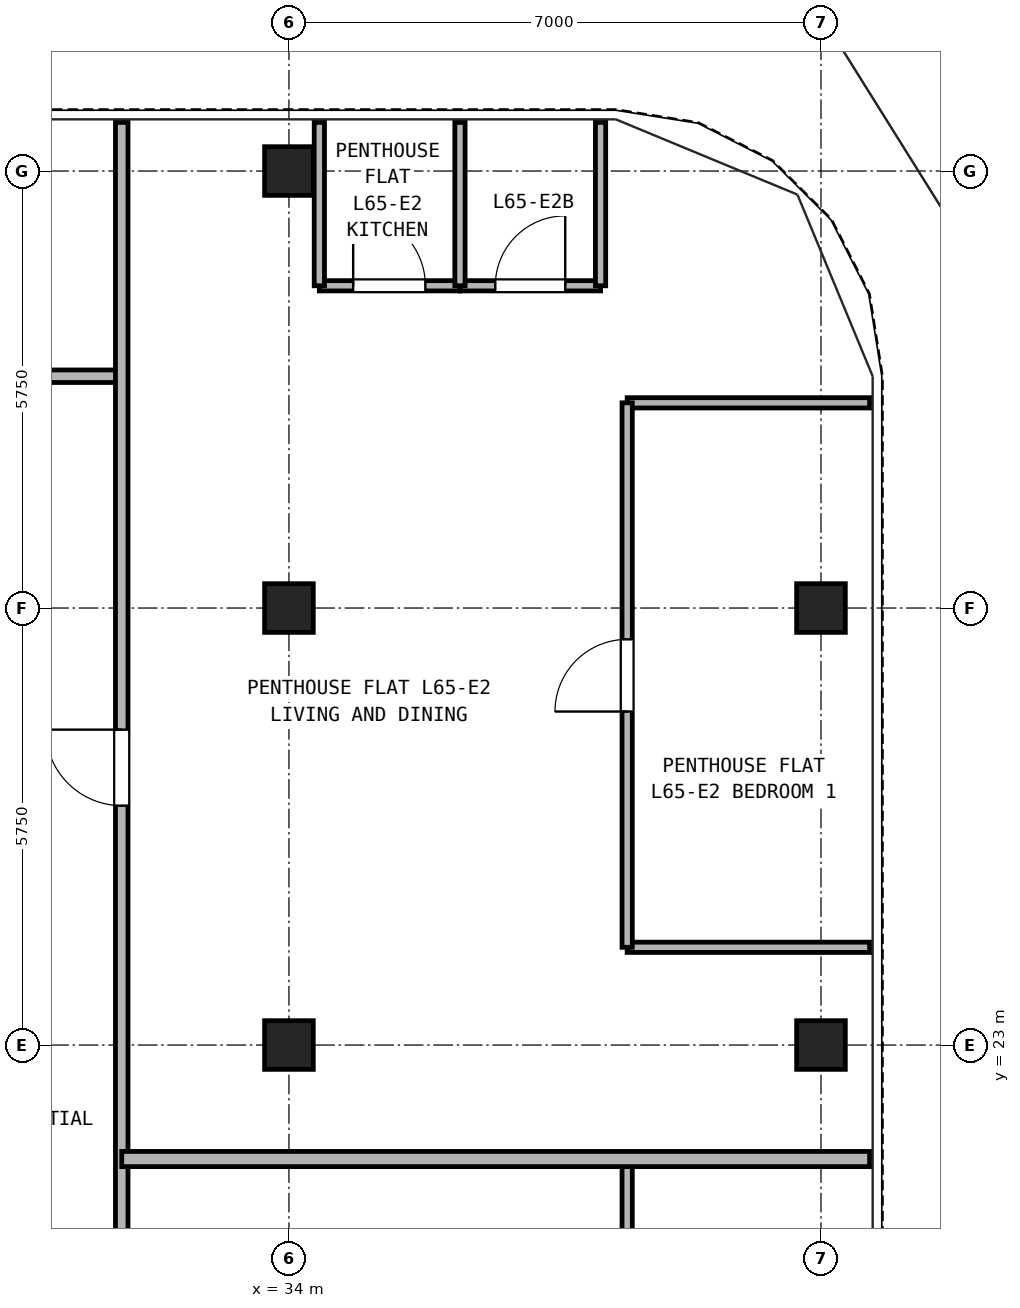
"""IFC4 building model, lengths in metres.
Left out: names, types, materials, properties, quantities, classifications, styles, units other than length and angle.
Written with IfcOpenShell. Run it as: python <this file> out.ifc"""

import sys

from ifc_helpers import new_model, si_unit, direction, frame, frame_2d, origin, origin_2d, place, context, subcontext, project, spatial, rectangle, hollow_rectangle, extrude, source, transform, mapped, element, fill, save


model = new_model("IFC4")
c1 = context("Model", 3, precision=1e-05, world=origin(), true_north=direction((0.0, 1.0)))
c2 = subcontext(c1, "Body", "Model", "MODEL_VIEW")
j1 = project(units=[si_unit("LENGTHUNIT", "METRE"), si_unit("PLANEANGLEUNIT", "RADIAN")], contexts=[c1])
p1 = place(None, origin())
s1 = spatial("IfcSite", under=j1, at=p1, CompositionType="ELEMENT")
p2 = place(p1, origin())
s2 = spatial("IfcBuilding", under=s1, at=p2, CompositionType="ELEMENT")
p3 = place(p2, frame((0.0, 0.0, 229.7)))
s3 = spatial("IfcBuildingStorey", under=s2, at=p3, CompositionType="ELEMENT", Elevation=229.7)
m1 = source(origin(), c2, "Body", "SweptSolid", [
    extrude(hollow_rectangle(XDim=0.64, YDim=0.64, WallThickness=0.035, at=origin_2d()), origin(), (0.0, 0.0, 1.0), 2.98),
])
for number, where, z_axis, x_axis in (
    (1, (34.0, 34.5, 0.0), (0.0, 0.0, 1.0), (1.0, 0.0, 0.0)),
    (2, (41.0, 23.0, 0.0), (0.0, 0.0, 1.0), (1.0, 0.0, 0.0)),
    (3, (41.0, 28.75, 0.0), (0.0, 0.0, 1.0), (1.0, 0.0, 0.0)),
    (4, (34.0, 23.0, 0.0), (0.0, 0.0, 1.0), (1.0, 0.0, 0.0)),
    (5, (34.0, 28.75, 0.0), (0.0, 0.0, 1.0), (1.0, 0.0, 0.0)),
):
    element("IfcColumn", number, at=place(p3, frame(where, z_axis=z_axis, x_axis=x_axis)), inside=s3, PredefinedType="COLUMN", context=c2, shape_type="MappedRepresentation", body=[
        mapped(m1, transform((0.0, 0.0, 0.0), x_axis=(1.0, 0.0, 0.0), y_axis=(0.0, 1.0, 0.0), z_axis=(0.0, 0.0, 1.0), scale=1.0)),
    ])
p4 = place(p3, frame((15.2, 31.8, 0.0), z_axis=(0.0, 0.0, 1.0), x_axis=(1.0, 0.0, 0.0)))
e6 = element("IfcWall", 6, at=p4, inside=s3, PredefinedType="PARTITIONING", context=c2, shape_type="SweptSolid", body=[
    extrude(rectangle(XDim=16.6, YDim=0.165, at=frame_2d((8.3, 0.0))), origin(), (0.0, 0.0, 1.0), 2.655),
])
p5 = place(p4, frame((3.65, 0.0, 0.0)))
e7 = element("IfcOpeningElement", 7, at=p5, cuts=e6, PredefinedType="OPENING", context=c2, shape_type="SweptSolid", body=[
    extrude(rectangle(XDim=0.95, YDim=2.15, at=frame_2d((0.475, 1.075))), frame((0.0, 0.093, 0.0), z_axis=(0.0, -1.0, 0.0), x_axis=(1.0, 0.0, 0.0)), (0.0, 0.0, 1.0), 0.185),
])
p6 = place(p4, frame((9.1, 0.0, 0.0)))
e8 = element("IfcOpeningElement", 8, at=p6, cuts=e6, PredefinedType="OPENING", context=c2, shape_type="SweptSolid", body=[
    extrude(rectangle(XDim=0.95, YDim=2.15, at=frame_2d((0.475, 1.075))), frame((0.0, 0.093, 0.0), z_axis=(0.0, -1.0, 0.0), x_axis=(1.0, 0.0, 0.0)), (0.0, 0.0, 1.0), 0.185),
])
p7 = place(p4, frame((13.25, 0.0, 0.0)))
e9 = element("IfcOpeningElement", 9, at=p7, cuts=e6, PredefinedType="OPENING", context=c2, shape_type="SweptSolid", body=[
    extrude(rectangle(XDim=0.92, YDim=2.1, at=frame_2d((0.46, 1.05))), frame((0.0, 0.093, 0.0), z_axis=(0.0, -1.0, 0.0), x_axis=(1.0, 0.0, 0.0)), (0.0, 0.0, 1.0), 0.185),
])
p8 = place(p3, frame((31.8, 10.65, 0.0), z_axis=(0.0, 0.0, 1.0), x_axis=(0.0, 1.0, 0.0)))
e10 = element("IfcWall", 10, at=p8, inside=s3, PredefinedType="PARTITIONING", context=c2, shape_type="SweptSolid", body=[
    extrude(rectangle(XDim=24.49, YDim=0.165, at=frame_2d((12.245, 0.0))), origin(), (0.0, 0.0, 1.0), 2.98),
])
p9 = place(p8, frame((4.925, 0.0, 0.0)))
e11 = element("IfcOpeningElement", 11, at=p9, cuts=e10, PredefinedType="OPENING", context=c2, shape_type="SweptSolid", body=[
    extrude(rectangle(XDim=1.0, YDim=2.15, at=frame_2d((0.5, 1.075))), frame((0.0, 0.093, 0.0), z_axis=(0.0, -1.0, 0.0), x_axis=(1.0, 0.0, 0.0)), (0.0, 0.0, 1.0), 0.185),
])
p10 = place(p8, frame((15.5, 0.0, 0.0)))
e12 = element("IfcOpeningElement", 12, at=p10, cuts=e10, PredefinedType="OPENING", context=c2, shape_type="SweptSolid", body=[
    extrude(rectangle(XDim=1.0, YDim=2.15, at=frame_2d((0.5, 1.075))), frame((0.0, 0.093, 0.0), z_axis=(0.0, -1.0, 0.0), x_axis=(1.0, 0.0, 0.0)), (0.0, 0.0, 1.0), 0.185),
])
p11 = place(p3, frame((38.45, 18.1, 0.0), z_axis=(0.0, 0.0, 1.0), x_axis=(0.0, 1.0, 0.0)))
e13 = element("IfcWall", 13, at=p11, inside=s3, PredefinedType="PARTITIONING", context=c2, shape_type="SweptSolid", body=[
    extrude(rectangle(XDim=3.4, YDim=0.135, at=frame_2d((1.7, 0.0))), origin(), (0.0, 0.0, 1.0), 2.98),
])
p12 = place(p11, frame((1.22, 0.0, 0.0)))
e14 = element("IfcOpeningElement", 14, at=p12, cuts=e13, PredefinedType="OPENING", context=c2, shape_type="SweptSolid", body=[
    extrude(rectangle(XDim=0.95, YDim=2.15, at=frame_2d((0.475, 1.075))), frame((0.0, 0.077, 0.0), z_axis=(0.0, -1.0, 0.0), x_axis=(1.0, 0.0, 0.0)), (0.0, 0.0, 1.0), 0.155),
])
p13 = place(p3, frame((31.8, 21.5, 0.0), z_axis=(0.0, 0.0, 1.0), x_axis=(1.0, 0.0, 0.0)))
e15 = element("IfcWall", 15, at=p13, inside=s3, PredefinedType="PARTITIONING", context=c2, shape_type="SweptSolid", body=[
    extrude(rectangle(XDim=9.84, YDim=0.2, at=frame_2d((4.92, 0.0))), origin(), (0.0, 0.0, 1.0), 2.98),
])
p14 = place(p3, frame((34.4, 32.99, 0.0), z_axis=(0.0, 0.0, 1.0), x_axis=(1.0, 0.0, 0.0)))
e16 = element("IfcWall", 16, at=p14, inside=s3, PredefinedType="PARTITIONING", context=c2, shape_type="SweptSolid", body=[
    extrude(rectangle(XDim=1.85, YDim=0.135, at=frame_2d((0.925, 0.0))), origin(), (0.0, 0.0, 1.0), 2.98),
])
p15 = place(p14, frame((0.445, 0.0, 0.0)))
e17 = element("IfcOpeningElement", 17, at=p15, cuts=e16, PredefinedType="OPENING", context=c2, shape_type="SweptSolid", body=[
    extrude(rectangle(XDim=0.95, YDim=2.15, at=frame_2d((0.475, 1.075))), frame((0.0, 0.077, 0.0), z_axis=(0.0, -1.0, 0.0), x_axis=(1.0, 0.0, 0.0)), (0.0, 0.0, 1.0), 0.155),
])
p16 = place(p3, frame((36.25, 32.99, 0.0), z_axis=(0.0, 0.0, 1.0), x_axis=(1.0, 0.0, 0.0)))
e18 = element("IfcWall", 18, at=p16, inside=s3, PredefinedType="PARTITIONING", context=c2, shape_type="SweptSolid", body=[
    extrude(rectangle(XDim=1.85, YDim=0.135, at=frame_2d((0.925, 0.0))), origin(), (0.0, 0.0, 1.0), 2.98),
])
p17 = place(p16, frame((0.465, 0.0, 0.0)))
e19 = element("IfcOpeningElement", 19, at=p17, cuts=e18, PredefinedType="OPENING", context=c2, shape_type="SweptSolid", body=[
    extrude(rectangle(XDim=0.92, YDim=2.1, at=frame_2d((0.46, 1.05))), frame((0.0, 0.077, 0.0), z_axis=(0.0, -1.0, 0.0), x_axis=(1.0, 0.0, 0.0)), (0.0, 0.0, 1.0), 0.155),
])
for number, where, z_axis, x_axis in (
    (20, (34.4, 32.99, 0.0), (0.0, 0.0, 1.0), (0.0, 1.0, 0.0)),
    (21, (36.25, 32.99, 0.0), (0.0, 0.0, 1.0), (0.0, 1.0, 0.0)),
    (22, (38.1, 32.99, 0.0), (0.0, 0.0, 1.0), (0.0, 1.0, 0.0)),
):
    element("IfcWall", number, at=place(p3, frame(where, z_axis=z_axis, x_axis=x_axis)), inside=s3, PredefinedType="PARTITIONING", context=c2, shape_type="SweptSolid", body=[
        extrude(rectangle(XDim=2.15, YDim=0.135, at=frame_2d((1.075, 0.0))), origin(), (0.0, 0.0, 1.0), 2.98),
    ])
for number, where, z_axis, x_axis in (
    (23, (38.45, 24.286, 0.0), (0.0, 0.0, 1.0), (1.0, 0.0, 0.0)),
    (24, (38.45, 31.45, 0.0), (0.0, 0.0, 1.0), (1.0, 0.0, 0.0)),
):
    element("IfcWall", number, at=place(p3, frame(where, z_axis=z_axis, x_axis=x_axis)), inside=s3, PredefinedType="PARTITIONING", context=c2, shape_type="SweptSolid", body=[
        extrude(rectangle(XDim=3.19, YDim=0.135, at=frame_2d((1.595, 0.0))), origin(), (0.0, 0.0, 1.0), 2.98),
    ])
p18 = place(p3, frame((38.45, 24.286, 0.0), z_axis=(0.0, 0.0, 1.0), x_axis=(0.0, 1.0, 0.0)))
e25 = element("IfcWall", 25, at=p18, inside=s3, PredefinedType="PARTITIONING", context=c2, shape_type="SweptSolid", body=[
    extrude(rectangle(XDim=7.164, YDim=0.135, at=frame_2d((3.582, 0.0))), origin(), (0.0, 0.0, 1.0), 2.98),
])
p19 = place(p18, frame((3.102, 0.0, 0.0)))
e26 = element("IfcOpeningElement", 26, at=p19, cuts=e25, PredefinedType="OPENING", context=c2, shape_type="SweptSolid", body=[
    extrude(rectangle(XDim=0.95, YDim=2.15, at=frame_2d((0.475, 1.075))), frame((0.0, 0.077, 0.0), z_axis=(0.0, -1.0, 0.0), x_axis=(1.0, 0.0, 0.0)), (0.0, 0.0, 1.0), 0.155),
])
p20 = place(p15, frame((0.95, 0.0, 0.0), z_axis=(0.0, 0.0, 1.0), x_axis=(-1.0, 0.0, 0.0)))
e27 = element("IfcDoor", 27, at=p20, inside=s3, OperationType="SINGLE_SWING_LEFT", PredefinedType="DOOR", context=c2, shape_type="SweptSolid", body=[
    extrude(rectangle(XDim=0.95, YDim=2.15, at=frame_2d((0.475, 1.075))), frame((0.0, 0.025, 0.0), z_axis=(0.0, -1.0, 0.0), x_axis=(1.0, 0.0, 0.0)), (0.0, 0.0, 1.0), 0.05),
])
fill(e17, e27)
p21 = place(p17, frame((0.92, 0.0, 0.0), z_axis=(0.0, 0.0, 1.0), x_axis=(-1.0, 0.0, 0.0)))
e28 = element("IfcDoor", 28, at=p21, inside=s3, OperationType="SINGLE_SWING_RIGHT", PredefinedType="DOOR", context=c2, shape_type="SweptSolid", body=[
    extrude(rectangle(XDim=0.92, YDim=2.1, at=frame_2d((0.46, 1.05))), frame((0.0, 0.025, 0.0), z_axis=(0.0, -1.0, 0.0), x_axis=(1.0, 0.0, 0.0)), (0.0, 0.0, 1.0), 0.05),
])
fill(e19, e28)
p22 = place(p19, frame((0.95, 0.0, 0.0), z_axis=(0.0, 0.0, 1.0), x_axis=(-1.0, 0.0, 0.0)))
e29 = element("IfcDoor", 29, at=p22, inside=s3, OperationType="SINGLE_SWING_LEFT", PredefinedType="DOOR", context=c2, shape_type="SweptSolid", body=[
    extrude(rectangle(XDim=0.95, YDim=2.15, at=frame_2d((0.475, 1.075))), frame((0.0, 0.025, 0.0), z_axis=(0.0, -1.0, 0.0), x_axis=(1.0, 0.0, 0.0)), (0.0, 0.0, 1.0), 0.05),
])
fill(e26, e29)
p23 = place(p10, frame((1.0, 0.0, 0.0), z_axis=(0.0, 0.0, 1.0), x_axis=(-1.0, 0.0, 0.0)))
e30 = element("IfcDoor", 30, at=p23, inside=s3, OperationType="SINGLE_SWING_RIGHT", PredefinedType="DOOR", context=c2, shape_type="SweptSolid", body=[
    extrude(rectangle(XDim=1.0, YDim=2.15, at=frame_2d((0.5, 1.075))), frame((0.0, 0.025, 0.0), z_axis=(0.0, -1.0, 0.0), x_axis=(1.0, 0.0, 0.0)), (0.0, 0.0, 1.0), 0.05),
])
fill(e12, e30)
save(model, sys.argv[1])
